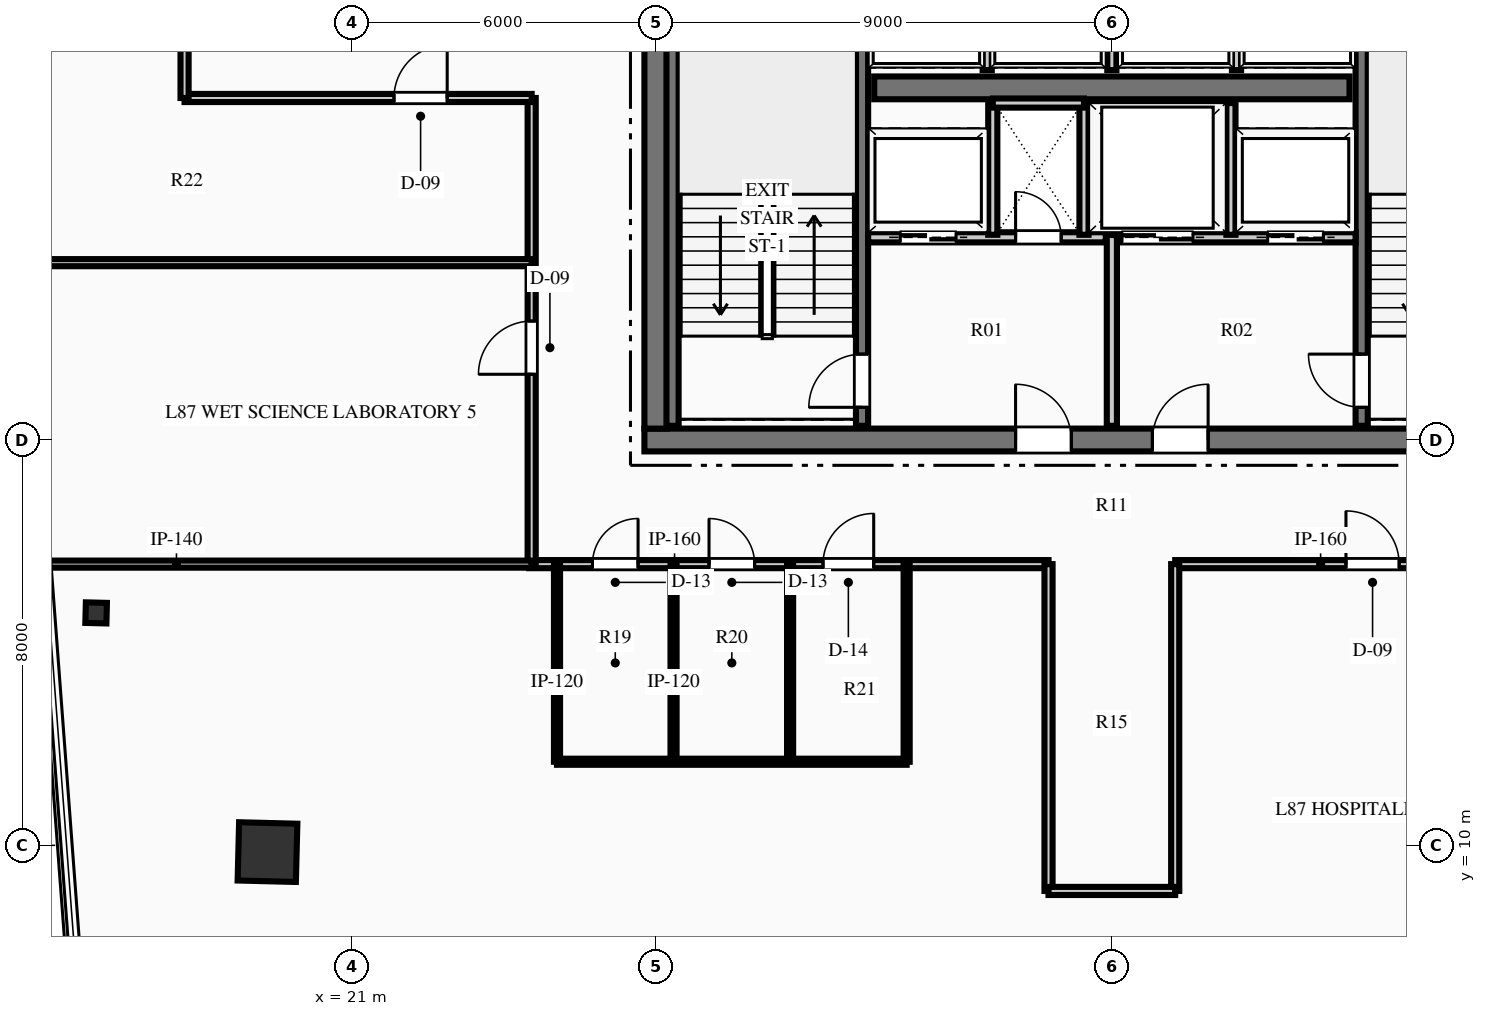
"""IFC4 building model, lengths in metres.
Left out: names, types, materials, properties, quantities, classifications, styles, units other than length and angle.
Written with IfcOpenShell. Run it as: python <this file> out.ifc"""

import sys

from ifc_helpers import new_model, si_unit, direction, frame, frame_2d, origin, origin_2d, place, context, subcontext, project, spatial, rectangle, hollow_rectangle, i_section, extrude, element, fill, save


model = new_model("IFC4")
c1 = context("Model", 3, precision=1e-05, world=origin(), true_north=direction((0.0, 1.0)))
c2 = subcontext(c1, "Body", "Model", "MODEL_VIEW")
j1 = project(units=[si_unit("LENGTHUNIT", "METRE"), si_unit("PLANEANGLEUNIT", "RADIAN")], contexts=[c1])
p1 = place(None, origin())
s1 = spatial("IfcSite", under=j1, at=p1, CompositionType="ELEMENT")
p2 = place(p1, origin())
s2 = spatial("IfcBuilding", under=s1, at=p2, CompositionType="ELEMENT")
p3 = place(p2, frame((0.0, 0.0, 343.95)))
s3 = spatial("IfcBuildingStorey", under=s2, at=p3, CompositionType="ELEMENT", Elevation=343.95)
p4 = place(p3, frame((26.775, 18.0, 0.0), z_axis=(0.0, 0.0, 1.0), x_axis=(1.0, 0.0, 0.0)))
e1 = element("IfcWall", 1, at=p4, inside=s3, PredefinedType="SHEAR", context=c2, shape_type="SweptSolid", body=[
    extrude(rectangle(XDim=18.45, YDim=0.45, at=frame_2d((9.225, 0.0))), origin(), (0.0, 0.0, 1.0), 3.75),
])
p5 = place(p4, frame((7.325, 0.0, 0.0)))
e2 = element("IfcOpeningElement", 2, at=p5, cuts=e1, PredefinedType="OPENING", context=c2, shape_type="SweptSolid", body=[
    extrude(rectangle(XDim=1.1, YDim=2.15, at=frame_2d((0.55, 1.075))), frame((0.0, 0.235, 0.0), z_axis=(0.0, -1.0, 0.0), x_axis=(1.0, 0.0, 0.0)), (0.0, 0.0, 1.0), 0.47),
])
p6 = place(p4, frame((10.025, 0.0, 0.0)))
e3 = element("IfcOpeningElement", 3, at=p6, cuts=e1, PredefinedType="OPENING", context=c2, shape_type="SweptSolid", body=[
    extrude(rectangle(XDim=1.1, YDim=2.15, at=frame_2d((0.55, 1.075))), frame((0.0, 0.235, 0.0), z_axis=(0.0, -1.0, 0.0), x_axis=(1.0, 0.0, 0.0)), (0.0, 0.0, 1.0), 0.47),
])
p7 = place(p3, frame((27.0, 18.225, 0.0), z_axis=(0.0, 0.0, 1.0), x_axis=(0.0, 1.0, 0.0)))
e4 = element("IfcWall", 4, at=p7, inside=s3, PredefinedType="SHEAR", context=c2, shape_type="SweptSolid", body=[
    extrude(rectangle(XDim=15.55, YDim=0.45, at=frame_2d((7.775, 0.0))), origin(), (0.0, 0.0, 1.0), 3.75),
])
p8 = place(p7, frame((10.015, 0.0, 0.0)))
e5 = element("IfcOpeningElement", 5, at=p8, cuts=e4, PredefinedType="OPENING", context=c2, shape_type="SweptSolid", body=[
    extrude(rectangle(XDim=1.4, YDim=2.2, at=frame_2d((0.7, 1.1))), frame((0.0, 0.235, 0.0), z_axis=(0.0, -1.0, 0.0), x_axis=(1.0, 0.0, 0.0)), (0.0, 0.0, 1.0), 0.47),
])
p9 = place(p3, frame((31.31, 24.95, 0.0), z_axis=(0.0, 0.0, 1.0), x_axis=(1.0, 0.0, 0.0)))
e6 = element("IfcWall", 6, at=p9, inside=s3, PredefinedType="SHEAR", context=c2, shape_type="SweptSolid", body=[
    extrude(rectangle(XDim=9.38, YDim=0.45, at=frame_2d((4.69, 0.0))), origin(), (0.0, 0.0, 1.0), 3.75),
])
p10 = place(p3, frame((31.07, 18.28, 0.0), z_axis=(0.0, 0.0, 1.0), x_axis=(0.0, 1.0, 0.0)))
e7 = element("IfcWall", 7, at=p10, inside=s3, PredefinedType="SHEAR", context=c2, shape_type="SweptSolid", body=[
    extrude(rectangle(XDim=8.26, YDim=0.24, at=frame_2d((4.13, 0.0))), origin(), (0.0, 0.0, 1.0), 3.75),
])
p11 = place(p10, frame((0.365, 0.0, 0.0)))
e8 = element("IfcOpeningElement", 8, at=p11, cuts=e7, PredefinedType="OPENING", context=c2, shape_type="SweptSolid", body=[
    extrude(rectangle(XDim=1.05, YDim=2.15, at=frame_2d((0.525, 1.075))), frame((0.0, 0.13, 0.0), z_axis=(0.0, -1.0, 0.0), x_axis=(1.0, 0.0, 0.0)), (0.0, 0.0, 1.0), 0.26),
])
p12 = place(p3, frame((27.33, 18.28, 0.0), z_axis=(0.0, 0.0, 1.0), x_axis=(0.0, 1.0, 0.0)))
e9 = element("IfcWall", 9, at=p12, inside=s3, PredefinedType="SHEAR", context=c2, shape_type="SweptSolid", body=[
    extrude(rectangle(XDim=8.26, YDim=0.24, at=frame_2d((4.13, 0.0))), origin(), (0.0, 0.0, 1.0), 3.75),
])
p13 = place(p3, frame((40.93, 18.28, 0.0), z_axis=(0.0, 0.0, 1.0), x_axis=(0.0, 1.0, 0.0)))
e10 = element("IfcWall", 10, at=p13, inside=s3, PredefinedType="SHEAR", context=c2, shape_type="SweptSolid", body=[
    extrude(rectangle(XDim=8.26, YDim=0.24, at=frame_2d((4.13, 0.0))), origin(), (0.0, 0.0, 1.0), 3.75),
])
p14 = place(p13, frame((0.365, 0.0, 0.0)))
e11 = element("IfcOpeningElement", 11, at=p14, cuts=e10, PredefinedType="OPENING", context=c2, shape_type="SweptSolid", body=[
    extrude(rectangle(XDim=1.05, YDim=2.15, at=frame_2d((0.525, 1.075))), frame((0.0, 0.13, 0.0), z_axis=(0.0, -1.0, 0.0), x_axis=(1.0, 0.0, 0.0)), (0.0, 0.0, 1.0), 0.26),
])
p15 = place(p3, frame((19.336, 9.866, 0.0), z_axis=(0.0, 0.0, 1.0), x_axis=(0.025304572866, 0.999679788028, 0.0)))
e12 = element("IfcColumn", 12, at=p15, inside=s3, PredefinedType="COLUMN", context=c2, shape_type="SweptSolid", body=[
    extrude(hollow_rectangle(XDim=1.15, YDim=1.15, WallThickness=0.05, at=origin_2d()), origin(), (0.0, 0.0, 1.0), 3.75),
])
p16 = place(p3, frame((15.955, 14.588, 0.0), z_axis=(0.0, 0.0, 1.0), x_axis=(0.025304572866, 0.999679788028, 0.0)))
e13 = element("IfcColumn", 13, at=p16, inside=s3, PredefinedType="COLUMN", context=c2, shape_type="SweptSolid", body=[
    extrude(i_section(OverallWidth=0.406, OverallDepth=0.416, WebThickness=0.03, FlangeThickness=0.048, at=origin_2d()), origin(), (0.0, 0.0, 1.0), 3.75),
])
p17 = place(p3, frame((36.0, 18.28, 0.0), z_axis=(0.0, 0.0, 1.0), x_axis=(0.0, 1.0, 0.0)))
e14 = element("IfcWall", 14, at=p17, inside=s3, PredefinedType="PARTITIONING", context=c2, shape_type="SweptSolid", body=[
    extrude(rectangle(XDim=3.77, YDim=0.2, at=frame_2d((1.885, 0.0))), origin(), (0.0, 0.0, 1.0), 3.43),
])
p18 = place(p3, frame((31.19, 22.0, 0.0), z_axis=(0.0, 0.0, 1.0), x_axis=(1.0, 0.0, 0.0)))
e15 = element("IfcWall", 15, at=p18, inside=s3, PredefinedType="PARTITIONING", context=c2, shape_type="SweptSolid", body=[
    extrude(rectangle(XDim=4.69, YDim=0.2, at=frame_2d((2.345, 0.0))), origin(), (0.0, 0.0, 1.0), 3.43),
])
p19 = place(p18, frame((2.91, 0.0, 0.0)))
e16 = element("IfcOpeningElement", 16, at=p19, cuts=e15, PredefinedType="OPENING", context=c2, shape_type="SweptSolid", body=[
    extrude(rectangle(XDim=0.9, YDim=2.15, at=frame_2d((0.45, 1.075))), frame((0.0, 0.11, 0.0), z_axis=(0.0, -1.0, 0.0), x_axis=(1.0, 0.0, 0.0)), (0.0, 0.0, 1.0), 0.22),
])
p20 = place(p18, frame((0.635, 0.0, 0.0)))
e17 = element("IfcOpeningElement", 17, at=p20, cuts=e15, PredefinedType="OPENING", context=c2, shape_type="SweptSolid", body=[
    extrude(rectangle(XDim=1.1, YDim=2.15, at=frame_2d((0.55, 1.075))), frame((0.0, 0.11, 0.0), z_axis=(0.0, -1.0, 0.0), x_axis=(1.0, 0.0, 0.0)), (0.0, 0.0, 1.0), 0.22),
])
p21 = place(p3, frame((36.12, 22.0, 0.0), z_axis=(0.0, 0.0, 1.0), x_axis=(1.0, 0.0, 0.0)))
e18 = element("IfcWall", 18, at=p21, inside=s3, PredefinedType="PARTITIONING", context=c2, shape_type="SweptSolid", body=[
    extrude(rectangle(XDim=4.69, YDim=0.2, at=frame_2d((2.345, 0.0))), origin(), (0.0, 0.0, 1.0), 3.43),
])
p22 = place(p21, frame((2.955, 0.0, 0.0)))
e19 = element("IfcOpeningElement", 19, at=p22, cuts=e18, PredefinedType="OPENING", context=c2, shape_type="SweptSolid", body=[
    extrude(rectangle(XDim=1.1, YDim=2.15, at=frame_2d((0.55, 1.075))), frame((0.0, 0.11, 0.0), z_axis=(0.0, -1.0, 0.0), x_axis=(1.0, 0.0, 0.0)), (0.0, 0.0, 1.0), 0.22),
])
p23 = place(p21, frame((0.08, 0.0, 0.0)))
e20 = element("IfcOpeningElement", 20, at=p23, cuts=e18, PredefinedType="OPENING", context=c2, shape_type="SweptSolid", body=[
    extrude(rectangle(XDim=1.4, YDim=2.2, at=frame_2d((0.7, 1.1))), frame((0.0, 0.11, 0.0), z_axis=(0.0, -1.0, 0.0), x_axis=(1.0, 0.0, 0.0)), (0.0, 0.0, 1.0), 0.22),
])
for number, where, z_axis, x_axis in (
    (21, (33.65, 22.05, 0.0), (0.0, 0.0, 1.0), (0.0, 1.0, 0.0)),
    (22, (35.45, 22.05, 0.0), (0.0, 0.0, 1.0), (0.0, 1.0, 0.0)),
):
    element("IfcWall", number, at=place(p3, frame(where, z_axis=z_axis, x_axis=x_axis)), inside=s3, PredefinedType="PARTITIONING", context=c2, shape_type="SweptSolid", body=[
        extrude(rectangle(XDim=2.6, YDim=0.18, at=frame_2d((1.3, 0.0))), origin(), (0.0, 0.0, 1.0), 3.43),
    ])
p24 = place(p3, frame((33.65, 24.65, 0.0), z_axis=(0.0, 0.0, 1.0), x_axis=(1.0, 0.0, 0.0)))
e23 = element("IfcWall", 23, at=p24, inside=s3, PredefinedType="PARTITIONING", context=c2, shape_type="SweptSolid", body=[
    extrude(rectangle(XDim=1.8, YDim=0.18, at=frame_2d((0.9, 0.0))), origin(), (0.0, 0.0, 1.0), 3.43),
])
p25 = place(p3, frame((38.35, 22.05, 0.0), z_axis=(0.0, 0.0, 1.0), x_axis=(0.0, 1.0, 0.0)))
e24 = element("IfcWall", 24, at=p25, inside=s3, PredefinedType="PARTITIONING", context=c2, shape_type="SweptSolid", body=[
    extrude(rectangle(XDim=2.6, YDim=0.18, at=frame_2d((1.3, 0.0))), origin(), (0.0, 0.0, 1.0), 3.43),
])
for number, where, z_axis, x_axis in (
    (25, (33.54, 25.3, 0.0), (0.0, 0.0, 1.0), (0.0, 1.0, 0.0)),
    (26, (36.0, 25.3, 0.0), (0.0, 0.0, 1.0), (0.0, 1.0, 0.0)),
    (27, (38.46, 25.3, 0.0), (0.0, 0.0, 1.0), (0.0, 1.0, 0.0)),
):
    element("IfcWall", number, at=place(p3, frame(where, z_axis=z_axis, x_axis=x_axis)), inside=s3, PredefinedType="PARTITIONING", context=c2, shape_type="SweptSolid", body=[
        extrude(rectangle(XDim=1.9, YDim=0.18, at=frame_2d((0.95, 0.0))), origin(), (0.0, 0.0, 1.0), 3.43),
    ])
p26 = place(p3, frame((24.5, 15.55, 0.0), z_axis=(0.0, 0.0, 1.0), x_axis=(1.0, 0.0, 0.0)))
e28 = element("IfcWall", 28, at=p26, inside=s3, PredefinedType="PARTITIONING", context=c2, shape_type="SweptSolid", body=[
    extrude(rectangle(XDim=10.25, YDim=0.16, at=frame_2d((5.125, 0.0))), origin(), (0.0, 0.0, 1.0), 3.43),
])
p27 = place(p26, frame((1.25, 0.0, 0.0)))
e29 = element("IfcOpeningElement", 29, at=p27, cuts=e28, PredefinedType="OPENING", context=c2, shape_type="SweptSolid", body=[
    extrude(rectangle(XDim=0.9, YDim=2.15, at=frame_2d((0.45, 1.075))), frame((0.0, 0.09, 0.0), z_axis=(0.0, -1.0, 0.0), x_axis=(1.0, 0.0, 0.0)), (0.0, 0.0, 1.0), 0.18),
])
p28 = place(p26, frame((3.55, 0.0, 0.0)))
e30 = element("IfcOpeningElement", 30, at=p28, cuts=e28, PredefinedType="OPENING", context=c2, shape_type="SweptSolid", body=[
    extrude(rectangle(XDim=0.9, YDim=2.15, at=frame_2d((0.45, 1.075))), frame((0.0, 0.09, 0.0), z_axis=(0.0, -1.0, 0.0), x_axis=(1.0, 0.0, 0.0)), (0.0, 0.0, 1.0), 0.18),
])
p29 = place(p26, frame((5.8, 0.0, 0.0)))
e31 = element("IfcOpeningElement", 31, at=p29, cuts=e28, PredefinedType="OPENING", context=c2, shape_type="SweptSolid", body=[
    extrude(rectangle(XDim=1.0, YDim=2.15, at=frame_2d((0.5, 1.075))), frame((0.0, 0.09, 0.0), z_axis=(0.0, -1.0, 0.0), x_axis=(1.0, 0.0, 0.0)), (0.0, 0.0, 1.0), 0.18),
])
p30 = place(p3, frame((37.25, 15.55, 0.0), z_axis=(0.0, 0.0, 1.0), x_axis=(1.0, 0.0, 0.0)))
e32 = element("IfcWall", 32, at=p30, inside=s3, PredefinedType="PARTITIONING", context=c2, shape_type="SweptSolid", body=[
    extrude(rectangle(XDim=10.25, YDim=0.16, at=frame_2d((5.125, 0.0))), origin(), (0.0, 0.0, 1.0), 3.43),
])
p31 = place(p30, frame((3.37, 0.0, 0.0)))
e33 = element("IfcOpeningElement", 33, at=p31, cuts=e32, PredefinedType="OPENING", context=c2, shape_type="SweptSolid", body=[
    extrude(rectangle(XDim=1.05, YDim=2.15, at=frame_2d((0.525, 1.075))), frame((0.0, 0.09, 0.0), z_axis=(0.0, -1.0, 0.0), x_axis=(1.0, 0.0, 0.0)), (0.0, 0.0, 1.0), 0.18),
])
p32 = place(p3, frame((24.55, 15.55, 0.0), z_axis=(0.0, 0.0, 1.0), x_axis=(0.0, 1.0, 0.0)))
e34 = element("IfcWall", 34, at=p32, inside=s3, PredefinedType="PARTITIONING", context=c2, shape_type="SweptSolid", body=[
    extrude(rectangle(XDim=9.2, YDim=0.16, at=frame_2d((4.6, 0.0))), origin(), (0.0, 0.0, 1.0), 3.43),
])
p33 = place(p32, frame((3.747, 0.0, 0.0)))
e35 = element("IfcOpeningElement", 35, at=p33, cuts=e34, PredefinedType="OPENING", context=c2, shape_type="SweptSolid", body=[
    extrude(rectangle(XDim=1.05, YDim=2.15, at=frame_2d((0.525, 1.075))), frame((0.0, 0.09, 0.0), z_axis=(0.0, -1.0, 0.0), x_axis=(1.0, 0.0, 0.0)), (0.0, 0.0, 1.0), 0.18),
])
for number, where, z_axis, x_axis in (
    (36, (34.75, 9.1, 0.0), (0.0, 0.0, 1.0), (0.0, 1.0, 0.0)),
    (37, (37.25, 9.1, 0.0), (0.0, 0.0, 1.0), (0.0, 1.0, 0.0)),
):
    element("IfcWall", number, at=place(p3, frame(where, z_axis=z_axis, x_axis=x_axis)), inside=s3, PredefinedType="PARTITIONING", context=c2, shape_type="SweptSolid", body=[
        extrude(rectangle(XDim=6.45, YDim=0.16, at=frame_2d((3.225, 0.0))), origin(), (0.0, 0.0, 1.0), 3.43),
    ])
p34 = place(p3, frame((34.75, 9.1, 0.0), z_axis=(0.0, 0.0, 1.0), x_axis=(1.0, 0.0, 0.0)))
e38 = element("IfcWall", 38, at=p34, inside=s3, PredefinedType="PARTITIONING", context=c2, shape_type="SweptSolid", body=[
    extrude(rectangle(XDim=2.5, YDim=0.16, at=frame_2d((1.25, 0.0))), origin(), (0.0, 0.0, 1.0), 3.43),
])
p35 = place(p3, frame((17.7, 24.75, 0.0), z_axis=(0.0, 0.0, 1.0), x_axis=(1.0, 0.0, 0.0)))
e39 = element("IfcWall", 39, at=p35, inside=s3, PredefinedType="PARTITIONING", context=c2, shape_type="SweptSolid", body=[
    extrude(rectangle(XDim=6.85, YDim=0.16, at=frame_2d((3.425, 0.0))), origin(), (0.0, 0.0, 1.0), 3.43),
])
p36 = place(p35, frame((4.133, 0.0, 0.0)))
e40 = element("IfcOpeningElement", 40, at=p36, cuts=e39, PredefinedType="OPENING", context=c2, shape_type="SweptSolid", body=[
    extrude(rectangle(XDim=1.05, YDim=2.15, at=frame_2d((0.525, 1.075))), frame((0.0, 0.09, 0.0), z_axis=(0.0, -1.0, 0.0), x_axis=(1.0, 0.0, 0.0)), (0.0, 0.0, 1.0), 0.18),
])
p37 = place(p3, frame((17.7, 24.75, 0.0), z_axis=(0.0, 0.0, 1.0), x_axis=(0.0, 1.0, 0.0)))
e41 = element("IfcWall", 41, at=p37, inside=s3, PredefinedType="PARTITIONING", context=c2, shape_type="SweptSolid", body=[
    extrude(rectangle(XDim=2.5, YDim=0.16, at=frame_2d((1.25, 0.0))), origin(), (0.0, 0.0, 1.0), 3.43),
])
p38 = place(p3, frame((25.05, 11.65, 0.0), z_axis=(0.0, 0.0, 1.0), x_axis=(0.0, 1.0, 0.0)))
e42 = element("IfcWall", 42, at=p38, inside=s3, PredefinedType="PARTITIONING", context=c2, shape_type="SweptSolid", body=[
    extrude(rectangle(XDim=3.9, YDim=0.12, at=frame_2d((1.95, 0.0))), origin(), (0.0, 0.0, 1.0), 3.019),
])
for number, where, z_axis, x_axis in (
    (43, (27.35, 11.65, 0.0), (0.0, 0.0, 1.0), (0.0, 1.0, 0.0)),
    (44, (29.65, 11.65, 0.0), (0.0, 0.0, 1.0), (0.0, 1.0, 0.0)),
    (45, (31.95, 11.65, 0.0), (0.0, 0.0, 1.0), (0.0, 1.0, 0.0)),
):
    element("IfcWall", number, at=place(p3, frame(where, z_axis=z_axis, x_axis=x_axis)), inside=s3, PredefinedType="PARTITIONING", context=c2, shape_type="SweptSolid", body=[
        extrude(rectangle(XDim=3.9, YDim=0.12, at=frame_2d((1.95, 0.0))), origin(), (0.0, 0.0, 1.0), 3.43),
    ])
p39 = place(p3, frame((25.05, 11.65, 0.0), z_axis=(0.0, 0.0, 1.0), x_axis=(1.0, 0.0, 0.0)))
e46 = element("IfcWall", 46, at=p39, inside=s3, PredefinedType="PARTITIONING", context=c2, shape_type="SweptSolid", body=[
    extrude(rectangle(XDim=6.9, YDim=0.12, at=frame_2d((3.45, 0.0))), origin(), (0.0, 0.0, 1.0), 3.43),
])
p40 = place(p3, frame((14.814, 15.55, 0.0), z_axis=(0.0, 0.0, 1.0), x_axis=(1.0, 0.0, 0.0)))
e47 = element("IfcWall", 47, at=p40, inside=s3, PredefinedType="PARTITIONING", context=c2, shape_type="SweptSolid", body=[
    extrude(rectangle(XDim=9.736, YDim=0.14, at=frame_2d((4.868, 0.0))), origin(), (0.0, 0.0, 1.0), 2.808),
])
p41 = place(p3, frame((14.366, 21.5, 0.0), z_axis=(0.0, 0.0, 1.0), x_axis=(1.0, 0.0, 0.0)))
e48 = element("IfcWall", 48, at=p41, inside=s3, PredefinedType="PARTITIONING", context=c2, shape_type="SweptSolid", body=[
    extrude(rectangle(XDim=10.184, YDim=0.14, at=frame_2d((5.092, 0.0))), origin(), (0.0, 0.0, 1.0), 3.43),
])
p42 = place(p11, origin())
e49 = element("IfcDoor", 49, at=p42, inside=s3, OperationType="SINGLE_SWING_LEFT", PredefinedType="DOOR", context=c2, shape_type="SweptSolid", body=[
    extrude(rectangle(XDim=1.05, YDim=2.15, at=frame_2d((0.525, 1.075))), frame((0.0, 0.025, 0.0), z_axis=(0.0, -1.0, 0.0), x_axis=(1.0, 0.0, 0.0)), (0.0, 0.0, 1.0), 0.05),
])
fill(e8, e49)
p43 = place(p14, origin())
e50 = element("IfcDoor", 50, at=p43, inside=s3, OperationType="SINGLE_SWING_RIGHT", PredefinedType="DOOR", context=c2, shape_type="SweptSolid", body=[
    extrude(rectangle(XDim=1.05, YDim=2.15, at=frame_2d((0.525, 1.075))), frame((0.0, 0.025, 0.0), z_axis=(0.0, -1.0, 0.0), x_axis=(1.0, 0.0, 0.0)), (0.0, 0.0, 1.0), 0.05),
])
fill(e11, e50)
p44 = place(p5, origin())
e51 = element("IfcDoor", 51, at=p44, inside=s3, OperationType="SINGLE_SWING_LEFT", PredefinedType="DOOR", context=c2, shape_type="SweptSolid", body=[
    extrude(rectangle(XDim=1.1, YDim=2.15, at=frame_2d((0.55, 1.075))), frame((0.0, 0.025, 0.0), z_axis=(0.0, -1.0, 0.0), x_axis=(1.0, 0.0, 0.0)), (0.0, 0.0, 1.0), 0.05),
])
fill(e2, e51)
p45 = place(p6, origin())
e52 = element("IfcDoor", 52, at=p45, inside=s3, OperationType="SINGLE_SWING_RIGHT", PredefinedType="DOOR", context=c2, shape_type="SweptSolid", body=[
    extrude(rectangle(XDim=1.1, YDim=2.15, at=frame_2d((0.55, 1.075))), frame((0.0, 0.025, 0.0), z_axis=(0.0, -1.0, 0.0), x_axis=(1.0, 0.0, 0.0)), (0.0, 0.0, 1.0), 0.05),
])
fill(e3, e52)
p46 = place(p19, origin())
e53 = element("IfcDoor", 53, at=p46, inside=s3, OperationType="SINGLE_SWING_LEFT", PredefinedType="DOOR", context=c2, shape_type="SweptSolid", body=[
    extrude(rectangle(XDim=0.9, YDim=2.15, at=frame_2d((0.45, 1.075))), frame((0.0, 0.025, 0.0), z_axis=(0.0, -1.0, 0.0), x_axis=(1.0, 0.0, 0.0)), (0.0, 0.0, 1.0), 0.05),
])
fill(e16, e53)
p47 = place(p27, origin())
e54 = element("IfcDoor", 54, at=p47, inside=s3, OperationType="SINGLE_SWING_RIGHT", PredefinedType="DOOR", context=c2, shape_type="SweptSolid", body=[
    extrude(rectangle(XDim=0.9, YDim=2.15, at=frame_2d((0.45, 1.075))), frame((0.0, 0.025, 0.0), z_axis=(0.0, -1.0, 0.0), x_axis=(1.0, 0.0, 0.0)), (0.0, 0.0, 1.0), 0.05),
])
fill(e29, e54)
p48 = place(p28, origin())
e55 = element("IfcDoor", 55, at=p48, inside=s3, OperationType="SINGLE_SWING_LEFT", PredefinedType="DOOR", context=c2, shape_type="SweptSolid", body=[
    extrude(rectangle(XDim=0.9, YDim=2.15, at=frame_2d((0.45, 1.075))), frame((0.0, 0.025, 0.0), z_axis=(0.0, -1.0, 0.0), x_axis=(1.0, 0.0, 0.0)), (0.0, 0.0, 1.0), 0.05),
])
fill(e30, e55)
p49 = place(p29, origin())
e56 = element("IfcDoor", 56, at=p49, inside=s3, OperationType="SINGLE_SWING_RIGHT", PredefinedType="DOOR", context=c2, shape_type="SweptSolid", body=[
    extrude(rectangle(XDim=1.0, YDim=2.15, at=frame_2d((0.5, 1.075))), frame((0.0, 0.025, 0.0), z_axis=(0.0, -1.0, 0.0), x_axis=(1.0, 0.0, 0.0)), (0.0, 0.0, 1.0), 0.05),
])
fill(e31, e56)
p50 = place(p31, origin())
e57 = element("IfcDoor", 57, at=p50, inside=s3, OperationType="SINGLE_SWING_LEFT", PredefinedType="DOOR", context=c2, shape_type="SweptSolid", body=[
    extrude(rectangle(XDim=1.05, YDim=2.15, at=frame_2d((0.525, 1.075))), frame((0.0, 0.025, 0.0), z_axis=(0.0, -1.0, 0.0), x_axis=(1.0, 0.0, 0.0)), (0.0, 0.0, 1.0), 0.05),
])
fill(e33, e57)
p51 = place(p33, origin())
e58 = element("IfcDoor", 58, at=p51, inside=s3, OperationType="SINGLE_SWING_LEFT", PredefinedType="DOOR", context=c2, shape_type="SweptSolid", body=[
    extrude(rectangle(XDim=1.05, YDim=2.15, at=frame_2d((0.525, 1.075))), frame((0.0, 0.025, 0.0), z_axis=(0.0, -1.0, 0.0), x_axis=(1.0, 0.0, 0.0)), (0.0, 0.0, 1.0), 0.05),
])
fill(e35, e58)
p52 = place(p36, origin())
e59 = element("IfcDoor", 59, at=p52, inside=s3, OperationType="SINGLE_SWING_RIGHT", PredefinedType="DOOR", context=c2, shape_type="SweptSolid", body=[
    extrude(rectangle(XDim=1.05, YDim=2.15, at=frame_2d((0.525, 1.075))), frame((0.0, 0.025, 0.0), z_axis=(0.0, -1.0, 0.0), x_axis=(1.0, 0.0, 0.0)), (0.0, 0.0, 1.0), 0.05),
])
fill(e40, e59)
p53 = place(p20, origin())
e60 = element("IfcDoor", 60, at=p53, inside=s3, OperationType="SLIDING_TO_LEFT", PredefinedType="DOOR", context=c2, shape_type="SweptSolid", body=[
    extrude(rectangle(XDim=1.1, YDim=2.15, at=frame_2d((0.55, 1.075))), frame((0.0, 0.025, 0.0), z_axis=(0.0, -1.0, 0.0), x_axis=(1.0, 0.0, 0.0)), (0.0, 0.0, 1.0), 0.05),
])
fill(e17, e60)
p54 = place(p22, origin())
e61 = element("IfcDoor", 61, at=p54, inside=s3, OperationType="SLIDING_TO_LEFT", PredefinedType="DOOR", context=c2, shape_type="SweptSolid", body=[
    extrude(rectangle(XDim=1.1, YDim=2.15, at=frame_2d((0.55, 1.075))), frame((0.0, 0.025, 0.0), z_axis=(0.0, -1.0, 0.0), x_axis=(1.0, 0.0, 0.0)), (0.0, 0.0, 1.0), 0.05),
])
fill(e19, e61)
p55 = place(p23, origin())
e62 = element("IfcDoor", 62, at=p55, inside=s3, OperationType="SLIDING_TO_LEFT", PredefinedType="DOOR", context=c2, shape_type="SweptSolid", body=[
    extrude(rectangle(XDim=1.4, YDim=2.2, at=frame_2d((0.7, 1.1))), frame((0.0, 0.025, 0.0), z_axis=(0.0, -1.0, 0.0), x_axis=(1.0, 0.0, 0.0)), (0.0, 0.0, 1.0), 0.05),
])
fill(e20, e62)
save(model, sys.argv[1])
